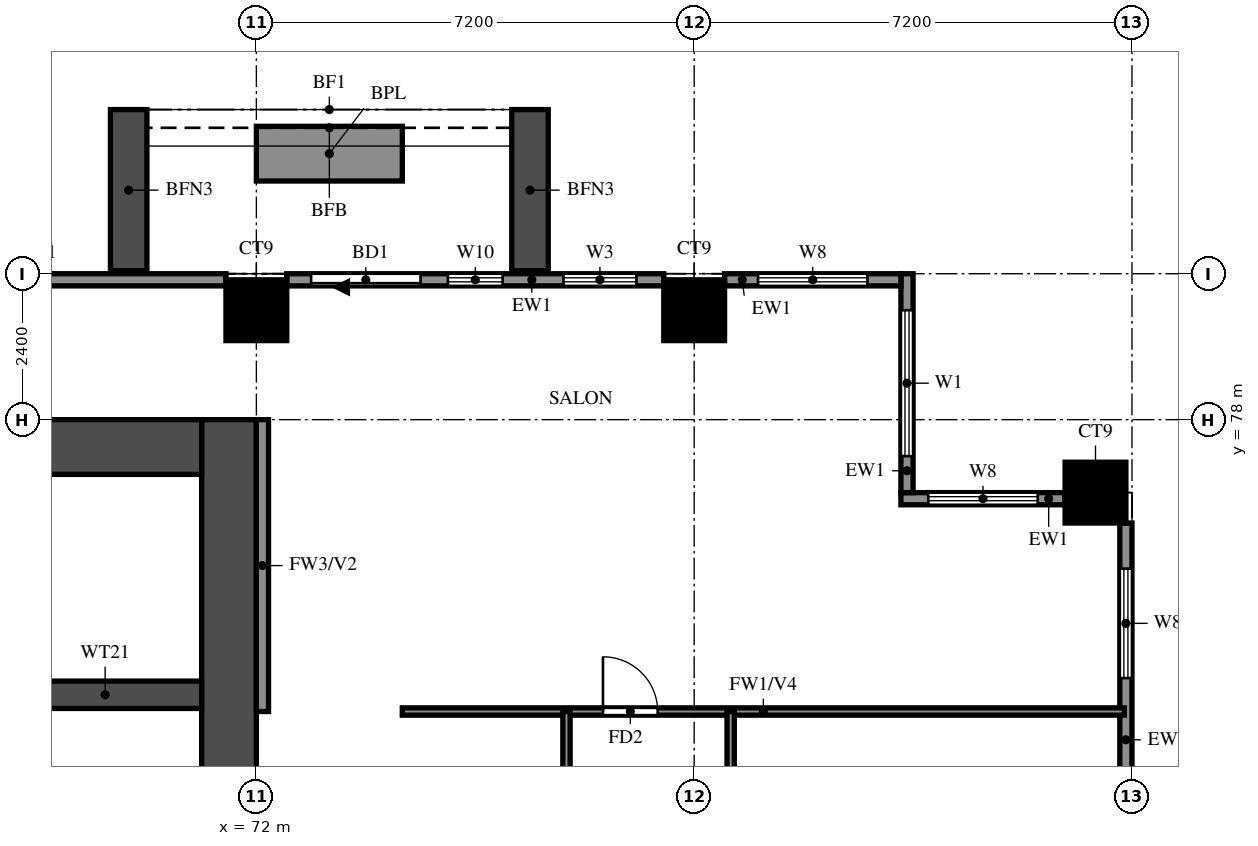
"""IFC4 building model, lengths in metres.
Left out: names, types, materials, properties, quantities, classifications, styles, units other than length and angle.
Written with IfcOpenShell. Run it as: python <this file> out.ifc"""

import sys

from ifc_helpers import new_model, si_unit, direction, frame, frame_2d, origin, origin_2d, place, context, subcontext, project, spatial, rectangle, extrude, source, transform, mapped, element, fill, save


model = new_model("IFC4")
c1 = context("Model", 3, precision=1e-05, world=origin(), true_north=direction((0.0, 1.0)))
c2 = subcontext(c1, "Body", "Model", "MODEL_VIEW")
j1 = project(units=[si_unit("LENGTHUNIT", "METRE"), si_unit("PLANEANGLEUNIT", "RADIAN")], contexts=[c1])
p1 = place(None, origin())
s1 = spatial("IfcSite", under=j1, at=p1, CompositionType="ELEMENT")
p2 = place(p1, origin())
s2 = spatial("IfcBuilding", under=s1, at=p2, CompositionType="ELEMENT")
p3 = place(p2, frame((0.0, 0.0, 69.0)))
s3 = spatial("IfcBuildingStorey", under=s2, at=p3, CompositionType="ELEMENT", Elevation=69.0)
m1 = source(origin(), c2, "Body", "SweptSolid", [
    extrude(rectangle(XDim=1.0, YDim=1.0, at=origin_2d()), origin(), (0.0, 0.0, 1.0), 3.18),
])
for number, where, z_axis, x_axis in (
    (1, (85.8, 76.8, 0.0), (0.0, 0.0, 1.0), (1.0, 0.0, 0.0)),
    (2, (72.0, 79.8, 0.0), (0.0, 0.0, 1.0), (1.0, 0.0, 0.0)),
    (3, (79.2, 79.8, 0.0), (0.0, 0.0, 1.0), (1.0, 0.0, 0.0)),
):
    element("IfcColumn", number, at=place(p3, frame(where, z_axis=z_axis, x_axis=x_axis)), inside=s3, PredefinedType="COLUMN", context=c2, shape_type="MappedRepresentation", body=[
        mapped(m1, transform((0.0, 0.0, 0.0))),
    ])
p4 = place(p3, frame((71.55, 66.0, 0.0), z_axis=(0.0, 0.0, 1.0), x_axis=(0.0, 1.0, 0.0)))
e4 = element("IfcWall", 4, at=p4, inside=s3, PredefinedType="SHEAR", context=c2, shape_type="SweptSolid", body=[
    extrude(rectangle(XDim=12.0, YDim=0.9, at=frame_2d((6.0, 0.0))), origin(), (0.0, 0.0, 1.0), 3.18),
])
p5 = place(p3, frame((29.7, 77.55, 0.0), z_axis=(0.0, 0.0, 1.0), x_axis=(1.0, 0.0, 0.0)))
e5 = element("IfcWall", 5, at=p5, inside=s3, PredefinedType="SHEAR", context=c2, shape_type="SweptSolid", body=[
    extrude(rectangle(XDim=41.4, YDim=0.9, at=frame_2d((20.7, 0.0))), origin(), (0.0, 0.0, 1.0), 3.18),
])
p6 = place(p3, frame((67.925, 73.475, 0.0), z_axis=(0.0, 0.0, 1.0), x_axis=(1.0, 0.0, 0.0)))
e6 = element("IfcWall", 6, at=p6, inside=s3, PredefinedType="SHEAR", context=c2, shape_type="SweptSolid", body=[
    extrude(rectangle(XDim=3.175, YDim=0.45, at=frame_2d((1.587, 0.0))), origin(), (0.0, 0.0, 1.0), 3.18),
])
p7 = place(p3, frame((86.3, 70.1, 0.0), z_axis=(0.0, 0.0, 1.0), x_axis=(0.0, 1.0, 0.0)))
e7 = element("IfcWall", 7, at=p7, inside=s3, PredefinedType="SOLIDWALL", context=c2, shape_type="SweptSolid", body=[
    extrude(rectangle(XDim=6.2, YDim=0.2, at=frame_2d((3.1, 0.0))), origin(), (0.0, 0.0, 1.0), 3.18),
])
p8 = place(p7, frame((1.2, 0.0, 1.5)))
e8 = element("IfcOpeningElement", 8, at=p8, cuts=e7, PredefinedType="OPENING", context=c2, shape_type="SweptSolid", body=[
    extrude(rectangle(XDim=0.9, YDim=0.9, at=frame_2d((0.45, 0.45))), frame((0.0, 0.11, 0.0), z_axis=(0.0, -1.0, 0.0), x_axis=(1.0, 0.0, 0.0)), (0.0, 0.0, 1.0), 0.22),
])
p9 = place(p7, frame((3.65, 0.0, 0.6)))
e9 = element("IfcOpeningElement", 9, at=p9, cuts=e7, PredefinedType="OPENING", context=c2, shape_type="SweptSolid", body=[
    extrude(rectangle(XDim=1.8, YDim=2.4, at=frame_2d((0.9, 1.2))), frame((0.0, 0.11, 0.0), z_axis=(0.0, -1.0, 0.0), x_axis=(1.0, 0.0, 0.0)), (0.0, 0.0, 1.0), 0.22),
])
p10 = place(p3, frame((85.3, 76.7, 0.0), z_axis=(0.0, 0.0, 1.0), x_axis=(-1.0, 0.0, 0.0)))
e10 = element("IfcWall", 10, at=p10, inside=s3, PredefinedType="SOLIDWALL", context=c2, shape_type="SweptSolid", body=[
    extrude(rectangle(XDim=2.7, YDim=0.2, at=frame_2d((1.35, 0.0))), origin(), (0.0, 0.0, 1.0), 3.18),
])
p11 = place(p10, frame((0.45, 0.0, 0.6)))
e11 = element("IfcOpeningElement", 11, at=p11, cuts=e10, PredefinedType="OPENING", context=c2, shape_type="SweptSolid", body=[
    extrude(rectangle(XDim=1.8, YDim=2.4, at=frame_2d((0.9, 1.2))), frame((0.0, 0.11, 0.0), z_axis=(0.0, -1.0, 0.0), x_axis=(1.0, 0.0, 0.0)), (0.0, 0.0, 1.0), 0.22),
])
p12 = place(p3, frame((82.7, 76.8, 0.0), z_axis=(0.0, 0.0, 1.0), x_axis=(0.0, 1.0, 0.0)))
e12 = element("IfcWall", 12, at=p12, inside=s3, PredefinedType="SOLIDWALL", context=c2, shape_type="SweptSolid", body=[
    extrude(rectangle(XDim=3.6, YDim=0.2, at=frame_2d((1.8, 0.0))), origin(), (0.0, 0.0, 1.0), 3.18),
])
p13 = place(p12, frame((0.6, 0.0, 0.6)))
e13 = element("IfcOpeningElement", 13, at=p13, cuts=e12, PredefinedType="OPENING", context=c2, shape_type="SweptSolid", body=[
    extrude(rectangle(XDim=2.4, YDim=2.4, at=frame_2d((1.2, 1.2))), frame((0.0, 0.11, 0.0), z_axis=(0.0, -1.0, 0.0), x_axis=(1.0, 0.0, 0.0)), (0.0, 0.0, 1.0), 0.22),
])
p14 = place(p3, frame((82.6, 80.3, 0.0), z_axis=(0.0, 0.0, 1.0), x_axis=(-1.0, 0.0, 0.0)))
e14 = element("IfcWall", 14, at=p14, inside=s3, PredefinedType="SOLIDWALL", context=c2, shape_type="SweptSolid", body=[
    extrude(rectangle(XDim=2.9, YDim=0.2, at=frame_2d((1.45, 0.0))), origin(), (0.0, 0.0, 1.0), 3.18),
])
p15 = place(p14, frame((0.55, 0.0, 0.6)))
e15 = element("IfcOpeningElement", 15, at=p15, cuts=e14, PredefinedType="OPENING", context=c2, shape_type="SweptSolid", body=[
    extrude(rectangle(XDim=1.8, YDim=2.4, at=frame_2d((0.9, 1.2))), frame((0.0, 0.11, 0.0), z_axis=(0.0, -1.0, 0.0), x_axis=(1.0, 0.0, 0.0)), (0.0, 0.0, 1.0), 0.22),
])
p16 = place(p3, frame((78.7, 80.3, 0.0), z_axis=(0.0, 0.0, 1.0), x_axis=(-1.0, 0.0, 0.0)))
e16 = element("IfcWall", 16, at=p16, inside=s3, PredefinedType="SOLIDWALL", context=c2, shape_type="SweptSolid", body=[
    extrude(rectangle(XDim=6.2, YDim=0.2, at=frame_2d((3.1, 0.0))), origin(), (0.0, 0.0, 1.0), 3.18),
])
p17 = place(p16, frame((4.0, 0.0, 0.0)))
e17 = element("IfcOpeningElement", 17, at=p17, cuts=e16, PredefinedType="OPENING", context=c2, shape_type="SweptSolid", body=[
    extrude(rectangle(XDim=1.8, YDim=2.4, at=frame_2d((0.9, 1.2))), frame((0.0, 0.11, 0.0), z_axis=(0.0, -1.0, 0.0), x_axis=(1.0, 0.0, 0.0)), (0.0, 0.0, 1.0), 0.22),
])
p18 = place(p16, frame((0.45, 0.0, 0.6)))
e18 = element("IfcOpeningElement", 18, at=p18, cuts=e16, PredefinedType="OPENING", context=c2, shape_type="SweptSolid", body=[
    extrude(rectangle(XDim=1.2, YDim=2.4, at=frame_2d((0.6, 1.2))), frame((0.0, 0.11, 0.0), z_axis=(0.0, -1.0, 0.0), x_axis=(1.0, 0.0, 0.0)), (0.0, 0.0, 1.0), 0.22),
])
p19 = place(p16, frame((2.65, 0.0, 0.6)))
e19 = element("IfcOpeningElement", 19, at=p19, cuts=e16, PredefinedType="OPENING", context=c2, shape_type="SweptSolid", body=[
    extrude(rectangle(XDim=0.9, YDim=2.4, at=frame_2d((0.45, 1.2))), frame((0.0, 0.11, 0.0), z_axis=(0.0, -1.0, 0.0), x_axis=(1.0, 0.0, 0.0)), (0.0, 0.0, 1.0), 0.22),
])
p20 = place(p3, frame((71.5, 80.3, 0.0), z_axis=(0.0, 0.0, 1.0), x_axis=(-1.0, 0.0, 0.0)))
e20 = element("IfcWall", 20, at=p20, inside=s3, PredefinedType="SOLIDWALL", context=c2, shape_type="SweptSolid", body=[
    extrude(rectangle(XDim=6.2, YDim=0.2, at=frame_2d((3.1, 0.0))), origin(), (0.0, 0.0, 1.0), 3.18),
])
for number, where, z_axis, x_axis in (
    (21, (76.5, 80.45, 0.0), (0.0, 0.0, 1.0), (0.0, 1.0, 0.0)),
    (22, (69.9, 80.45, 0.0), (0.0, 0.0, 1.0), (0.0, 1.0, 0.0)),
):
    element("IfcWall", number, at=place(p3, frame(where, z_axis=z_axis, x_axis=x_axis)), inside=s3, PredefinedType="SOLIDWALL", context=c2, shape_type="SweptSolid", body=[
        extrude(rectangle(XDim=2.65, YDim=0.6, at=frame_2d((1.325, 0.0))), origin(), (0.0, 0.0, 1.0), 2.85),
    ])
p21 = place(p3, frame((74.4, 82.375, 0.0), z_axis=(0.0, 0.0, 1.0), x_axis=(-1.0, 0.0, 0.0)))
e23 = element("IfcWall", 23, at=p21, inside=s3, PredefinedType="SOLIDWALL", context=c2, shape_type="SweptSolid", body=[
    extrude(rectangle(XDim=2.4, YDim=0.9, at=frame_2d((1.2, 0.0))), origin(), (0.0, 0.0, 1.0), 0.9),
])
p22 = place(p3, frame((72.1, 73.2, 0.0), z_axis=(0.0, 0.0, 1.0), x_axis=(0.0, 1.0, 0.0)))
e24 = element("IfcWall", 24, at=p22, inside=s3, PredefinedType="SOLIDWALL", context=c2, shape_type="SweptSolid", body=[
    extrude(rectangle(XDim=4.8, YDim=0.2, at=frame_2d((2.4, 0.0))), origin(), (0.0, 0.0, 1.0), 3.18),
])
p23 = place(p3, frame((74.4, 73.2, 0.0), z_axis=(0.0, 0.0, 1.0), x_axis=(1.0, 0.0, 0.0)))
e25 = element("IfcWall", 25, at=p23, inside=s3, PredefinedType="PARTITIONING", context=c2, shape_type="SweptSolid", body=[
    extrude(rectangle(XDim=11.875, YDim=0.12, at=frame_2d((5.938, 0.0))), origin(), (0.0, 0.0, 1.0), 2.28),
])
p24 = place(p23, frame((3.3, 0.0, 0.0)))
e26 = element("IfcOpeningElement", 26, at=p24, cuts=e25, PredefinedType="OPENING", context=c2, shape_type="SweptSolid", body=[
    extrude(rectangle(XDim=0.9, YDim=2.1, at=frame_2d((0.45, 1.05))), frame((0.0, 0.07, 0.0), z_axis=(0.0, -1.0, 0.0), x_axis=(1.0, 0.0, 0.0)), (0.0, 0.0, 1.0), 0.14),
])
p25 = place(p3, frame((77.1, 64.8, 0.0), z_axis=(0.0, 0.0, 1.0), x_axis=(0.0, 1.0, 0.0)))
e27 = element("IfcWall", 27, at=p25, inside=s3, PredefinedType="PARTITIONING", context=c2, shape_type="SweptSolid", body=[
    extrude(rectangle(XDim=8.4, YDim=0.12, at=frame_2d((4.2, 0.0))), origin(), (0.0, 0.0, 1.0), 3.18),
])
p26 = place(p25, frame((5.05, 0.0, 0.0)))
e28 = element("IfcOpeningElement", 28, at=p26, cuts=e27, PredefinedType="OPENING", context=c2, shape_type="SweptSolid", body=[
    extrude(rectangle(XDim=0.9, YDim=2.1, at=frame_2d((0.45, 1.05))), frame((0.0, 0.07, 0.0), z_axis=(0.0, -1.0, 0.0), x_axis=(1.0, 0.0, 0.0)), (0.0, 0.0, 1.0), 0.14),
])
p27 = place(p3, frame((79.8, 69.6, 0.0), z_axis=(0.0, 0.0, 1.0), x_axis=(0.0, 1.0, 0.0)))
e29 = element("IfcWall", 29, at=p27, inside=s3, PredefinedType="PARTITIONING", context=c2, shape_type="SweptSolid", body=[
    extrude(rectangle(XDim=3.6, YDim=0.12, at=frame_2d((1.8, 0.0))), origin(), (0.0, 0.0, 1.0), 3.18),
])
p28 = place(p9, origin())
e30 = element("IfcWindow", 30, at=p28, inside=s3, PartitioningType="DOUBLE_PANEL_VERTICAL", PredefinedType="WINDOW", context=c2, shape_type="SweptSolid", body=[
    extrude(rectangle(XDim=1.8, YDim=2.4, at=frame_2d((0.9, 1.2))), frame((0.0, 0.03, 0.0), z_axis=(0.0, -1.0, 0.0), x_axis=(1.0, 0.0, 0.0)), (0.0, 0.0, 1.0), 0.06),
])
fill(e9, e30)
p29 = place(p11, origin())
e31 = element("IfcWindow", 31, at=p29, inside=s3, PartitioningType="DOUBLE_PANEL_VERTICAL", PredefinedType="WINDOW", context=c2, shape_type="SweptSolid", body=[
    extrude(rectangle(XDim=1.8, YDim=2.4, at=frame_2d((0.9, 1.2))), frame((0.0, 0.03, 0.0), z_axis=(0.0, -1.0, 0.0), x_axis=(1.0, 0.0, 0.0)), (0.0, 0.0, 1.0), 0.06),
])
fill(e11, e31)
p30 = place(p13, origin())
e32 = element("IfcWindow", 32, at=p30, inside=s3, PartitioningType="DOUBLE_PANEL_VERTICAL", PredefinedType="WINDOW", context=c2, shape_type="SweptSolid", body=[
    extrude(rectangle(XDim=2.4, YDim=2.4, at=frame_2d((1.2, 1.2))), frame((0.0, 0.03, 0.0), z_axis=(0.0, -1.0, 0.0), x_axis=(1.0, 0.0, 0.0)), (0.0, 0.0, 1.0), 0.06),
])
fill(e13, e32)
p31 = place(p15, origin())
e33 = element("IfcWindow", 33, at=p31, inside=s3, PartitioningType="DOUBLE_PANEL_VERTICAL", PredefinedType="WINDOW", context=c2, shape_type="SweptSolid", body=[
    extrude(rectangle(XDim=1.8, YDim=2.4, at=frame_2d((0.9, 1.2))), frame((0.0, 0.03, 0.0), z_axis=(0.0, -1.0, 0.0), x_axis=(1.0, 0.0, 0.0)), (0.0, 0.0, 1.0), 0.06),
])
fill(e15, e33)
p32 = place(p17, origin())
e34 = element("IfcDoor", 34, at=p32, inside=s3, OperationType="DOUBLE_DOOR_SLIDING", PredefinedType="DOOR", context=c2, shape_type="SweptSolid", body=[
    extrude(rectangle(XDim=1.8, YDim=2.4, at=frame_2d((0.9, 1.2))), frame((0.0, 0.025, 0.0), z_axis=(0.0, -1.0, 0.0), x_axis=(1.0, 0.0, 0.0)), (0.0, 0.0, 1.0), 0.05),
])
fill(e17, e34)
p33 = place(p18, origin())
e35 = element("IfcWindow", 35, at=p33, inside=s3, PartitioningType="SINGLE_PANEL", PredefinedType="WINDOW", context=c2, shape_type="SweptSolid", body=[
    extrude(rectangle(XDim=1.2, YDim=2.4, at=frame_2d((0.6, 1.2))), frame((0.0, 0.03, 0.0), z_axis=(0.0, -1.0, 0.0), x_axis=(1.0, 0.0, 0.0)), (0.0, 0.0, 1.0), 0.06),
])
fill(e18, e35)
p34 = place(p19, origin())
e36 = element("IfcWindow", 36, at=p34, inside=s3, PartitioningType="SINGLE_PANEL", PredefinedType="WINDOW", context=c2, shape_type="SweptSolid", body=[
    extrude(rectangle(XDim=0.9, YDim=2.4, at=frame_2d((0.45, 1.2))), frame((0.0, 0.03, 0.0), z_axis=(0.0, -1.0, 0.0), x_axis=(1.0, 0.0, 0.0)), (0.0, 0.0, 1.0), 0.06),
])
fill(e19, e36)
p35 = place(p24, origin())
e37 = element("IfcDoor", 37, at=p35, inside=s3, OperationType="SINGLE_SWING_RIGHT", PredefinedType="DOOR", context=c2, shape_type="SweptSolid", body=[
    extrude(rectangle(XDim=0.9, YDim=2.1, at=frame_2d((0.45, 1.05))), frame((0.0, 0.025, 0.0), z_axis=(0.0, -1.0, 0.0), x_axis=(1.0, 0.0, 0.0)), (0.0, 0.0, 1.0), 0.05),
])
fill(e26, e37)
save(model, sys.argv[1])
